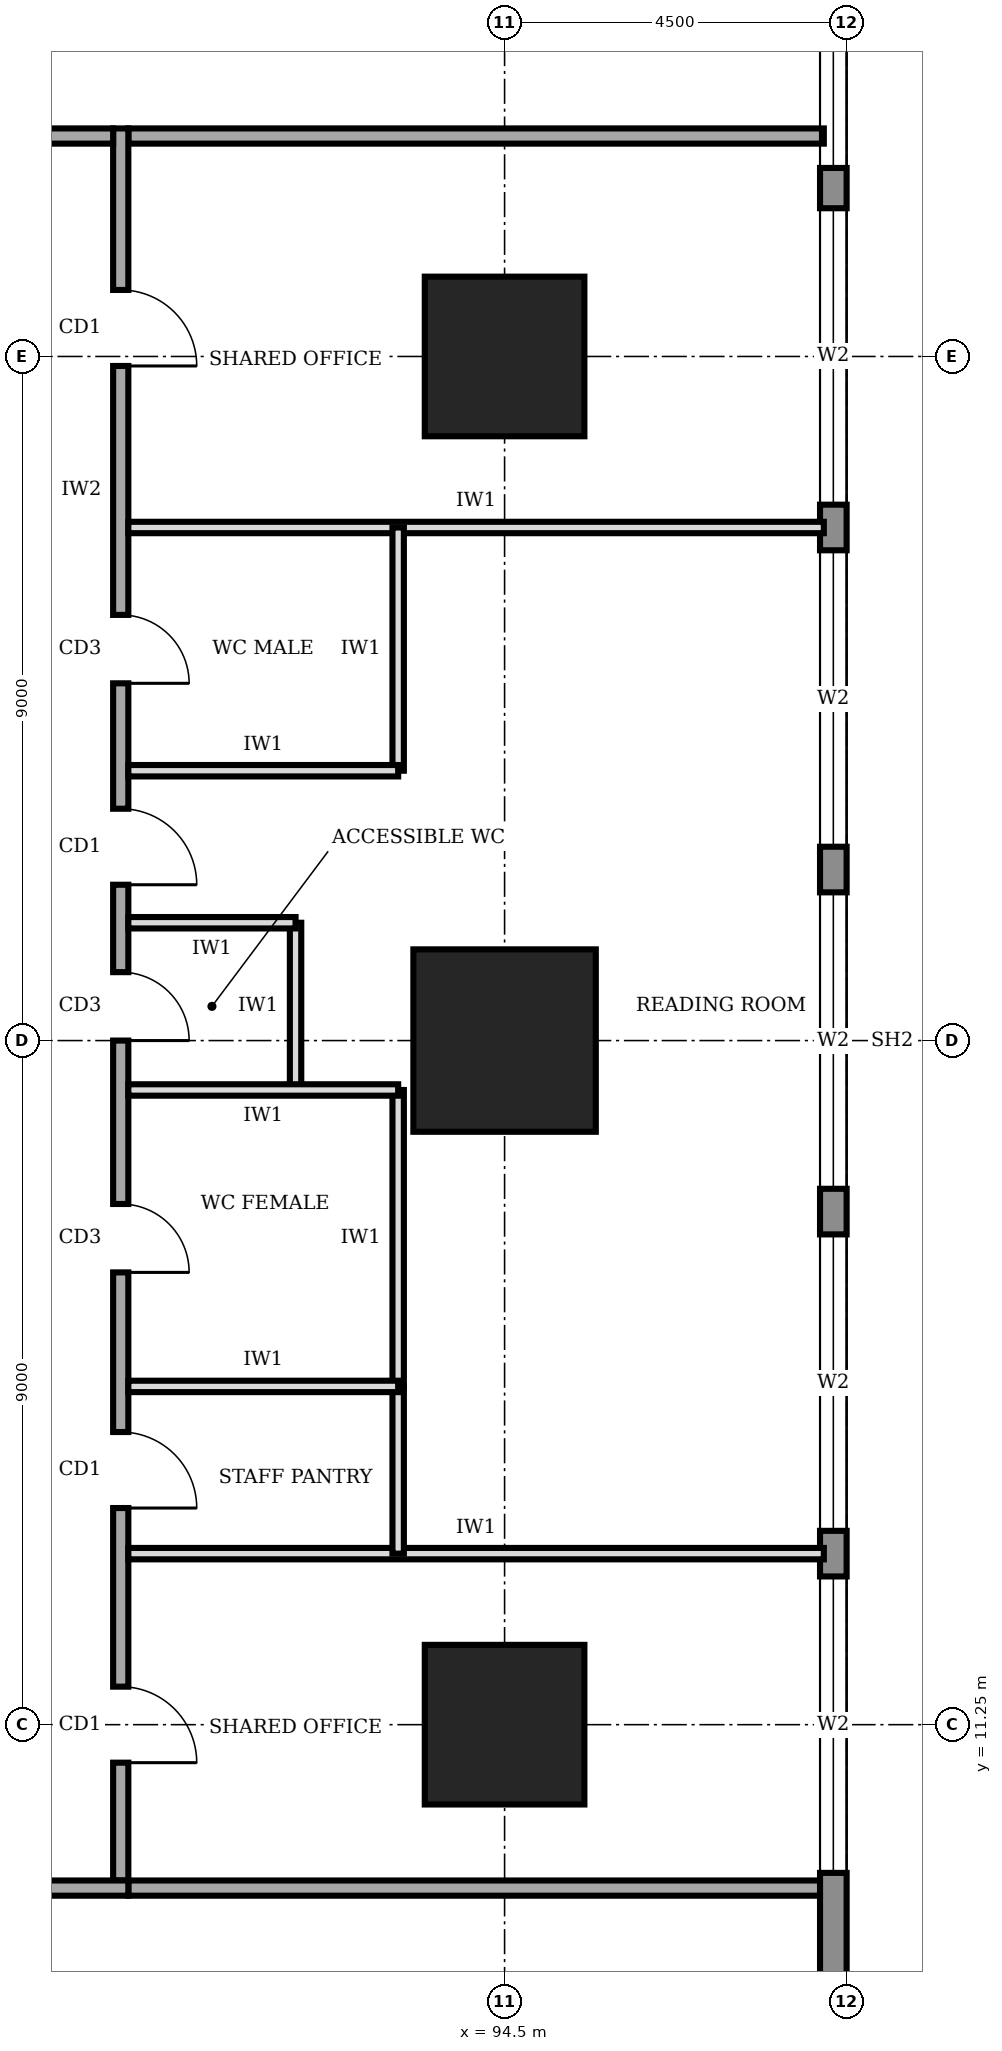
"""IFC4 building model, lengths in metres.
Left out: names, types, materials, properties, quantities, classifications, styles, units other than length and angle.
Written with IfcOpenShell. Run it as: python <this file> out.ifc"""

import sys

from ifc_helpers import new_model, si_unit, direction, frame, frame_2d, origin, origin_2d, place, context, subcontext, project, spatial, rectangle, extrude, element, fill, save


model = new_model("IFC4")
c1 = context("Model", 3, precision=1e-05, world=origin(), true_north=direction((0.0, 1.0)))
c2 = subcontext(c1, "Body", "Model", "MODEL_VIEW")
j1 = project(units=[si_unit("LENGTHUNIT", "METRE"), si_unit("PLANEANGLEUNIT", "RADIAN")], contexts=[c1])
p1 = place(None, origin())
s1 = spatial("IfcSite", under=j1, at=p1, CompositionType="ELEMENT")
p2 = place(p1, origin())
s2 = spatial("IfcBuilding", under=s1, at=p2, CompositionType="ELEMENT")
p3 = place(p2, frame((0.0, 0.0, 49.0)))
s3 = spatial("IfcBuildingStorey", under=s2, at=p3, CompositionType="ELEMENT", Elevation=49.0)
p4 = place(p3, frame((94.5, 11.25, 0.0), z_axis=(0.0, 0.0, 1.0), x_axis=(1.0, 0.0, 0.0)))
e1 = element("IfcColumn", 1, at=p4, inside=s3, PredefinedType="COLUMN", context=c2, shape_type="SweptSolid", body=[
    extrude(rectangle(XDim=2.1, YDim=2.1, at=origin_2d()), origin(), (0.0, 0.0, 1.0), 4.0),
])
p5 = place(p3, frame((94.5, 20.25, 0.0), z_axis=(0.0, 0.0, 1.0), x_axis=(1.0, 0.0, 0.0)))
e2 = element("IfcColumn", 2, at=p5, inside=s3, PredefinedType="COLUMN", context=c2, shape_type="SweptSolid", body=[
    extrude(rectangle(XDim=2.4, YDim=2.4, at=origin_2d()), origin(), (0.0, 0.0, 1.0), 4.0),
])
p6 = place(p3, frame((94.5, 29.25, 0.0), z_axis=(0.0, 0.0, 1.0), x_axis=(1.0, 0.0, 0.0)))
e3 = element("IfcColumn", 3, at=p6, inside=s3, PredefinedType="COLUMN", context=c2, shape_type="SweptSolid", body=[
    extrude(rectangle(XDim=2.1, YDim=2.1, at=origin_2d()), origin(), (0.0, 0.0, 1.0), 4.0),
])
p7 = place(p3, frame((98.825, 4.52, 0.0), z_axis=(0.0, 0.0, 1.0), x_axis=(0.0, 1.0, 0.0)))
e4 = element("IfcWall", 4, at=p7, inside=s3, PredefinedType="STANDARD", context=c2, shape_type="SweptSolid", body=[
    extrude(rectangle(XDim=31.46, YDim=0.35, at=frame_2d((15.73, 0.0))), origin(), (0.0, 0.0, 1.0), 3.75),
])
p8 = place(p7, frame((4.78, 0.0, 0.6)))
e5 = element("IfcOpeningElement", 5, at=p8, cuts=e4, PredefinedType="OPENING", context=c2, shape_type="SweptSolid", body=[
    extrude(rectangle(XDim=3.9, YDim=2.6, at=frame_2d((1.95, 1.3))), frame((0.0, 0.185, 0.0), z_axis=(0.0, -1.0, 0.0), x_axis=(1.0, 0.0, 0.0)), (0.0, 0.0, 1.0), 0.37),
])
p9 = place(p7, frame((9.28, 0.0, 0.6)))
e6 = element("IfcOpeningElement", 6, at=p9, cuts=e4, PredefinedType="OPENING", context=c2, shape_type="SweptSolid", body=[
    extrude(rectangle(XDim=3.9, YDim=2.6, at=frame_2d((1.95, 1.3))), frame((0.0, 0.185, 0.0), z_axis=(0.0, -1.0, 0.0), x_axis=(1.0, 0.0, 0.0)), (0.0, 0.0, 1.0), 0.37),
])
p10 = place(p7, frame((13.78, 0.0, 0.6)))
e7 = element("IfcOpeningElement", 7, at=p10, cuts=e4, PredefinedType="OPENING", context=c2, shape_type="SweptSolid", body=[
    extrude(rectangle(XDim=3.9, YDim=2.6, at=frame_2d((1.95, 1.3))), frame((0.0, 0.185, 0.0), z_axis=(0.0, -1.0, 0.0), x_axis=(1.0, 0.0, 0.0)), (0.0, 0.0, 1.0), 0.37),
])
p11 = place(p7, frame((18.28, 0.0, 0.6)))
e8 = element("IfcOpeningElement", 8, at=p11, cuts=e4, PredefinedType="OPENING", context=c2, shape_type="SweptSolid", body=[
    extrude(rectangle(XDim=3.9, YDim=2.6, at=frame_2d((1.95, 1.3))), frame((0.0, 0.185, 0.0), z_axis=(0.0, -1.0, 0.0), x_axis=(1.0, 0.0, 0.0)), (0.0, 0.0, 1.0), 0.37),
])
p12 = place(p7, frame((22.78, 0.0, 0.6)))
e9 = element("IfcOpeningElement", 9, at=p12, cuts=e4, PredefinedType="OPENING", context=c2, shape_type="SweptSolid", body=[
    extrude(rectangle(XDim=3.9, YDim=2.6, at=frame_2d((1.95, 1.3))), frame((0.0, 0.185, 0.0), z_axis=(0.0, -1.0, 0.0), x_axis=(1.0, 0.0, 0.0)), (0.0, 0.0, 1.0), 0.37),
])
p13 = place(p7, frame((27.21, 0.0, 0.6)))
e10 = element("IfcOpeningElement", 10, at=p13, cuts=e4, PredefinedType="OPENING", context=c2, shape_type="SweptSolid", body=[
    extrude(rectangle(XDim=3.9, YDim=2.6, at=frame_2d((1.95, 1.3))), frame((0.0, 0.185, 0.0), z_axis=(0.0, -1.0, 0.0), x_axis=(1.0, 0.0, 0.0)), (0.0, 0.0, 1.0), 0.37),
])
p14 = place(p3, frame((71.9, 9.1, 0.0), z_axis=(0.0, 0.0, 1.0), x_axis=(1.0, 0.0, 0.0)))
e11 = element("IfcWall", 11, at=p14, inside=s3, PredefinedType="SOLIDWALL", context=c2, shape_type="SweptSolid", body=[
    extrude(rectangle(XDim=17.65, YDim=0.2, at=frame_2d((8.825, 0.0))), origin(), (0.0, 0.0, 1.0), 3.75),
])
p15 = place(p14, frame((5.8, 0.0, 0.0)))
e12 = element("IfcOpeningElement", 12, at=p15, cuts=e11, PredefinedType="OPENING", context=c2, shape_type="SweptSolid", body=[
    extrude(rectangle(XDim=1.8, YDim=2.1, at=frame_2d((0.9, 1.05))), frame((0.0, 0.11, 0.0), z_axis=(0.0, -1.0, 0.0), x_axis=(1.0, 0.0, 0.0)), (0.0, 0.0, 1.0), 0.22),
])
p16 = place(p14, frame((14.725, 0.0, 0.0)))
e13 = element("IfcOpeningElement", 13, at=p16, cuts=e11, PredefinedType="OPENING", context=c2, shape_type="SweptSolid", body=[
    extrude(rectangle(XDim=1.8, YDim=2.1, at=frame_2d((0.9, 1.05))), frame((0.0, 0.11, 0.0), z_axis=(0.0, -1.0, 0.0), x_axis=(1.0, 0.0, 0.0)), (0.0, 0.0, 1.0), 0.22),
])
p17 = place(p3, frame((89.45, 9.2, 0.0), z_axis=(0.0, 0.0, 1.0), x_axis=(0.0, 1.0, 0.0)))
e14 = element("IfcWall", 14, at=p17, inside=s3, PredefinedType="SOLIDWALL", context=c2, shape_type="SweptSolid", body=[
    extrude(rectangle(XDim=23.05, YDim=0.2, at=frame_2d((11.525, 0.0))), origin(), (0.0, 0.0, 1.0), 3.75),
])
p18 = place(p17, frame((1.55, 0.0, 0.0)))
e15 = element("IfcOpeningElement", 15, at=p18, cuts=e14, PredefinedType="OPENING", context=c2, shape_type="SweptSolid", body=[
    extrude(rectangle(XDim=1.0, YDim=2.1, at=frame_2d((0.5, 1.05))), frame((0.0, 0.11, 0.0), z_axis=(0.0, -1.0, 0.0), x_axis=(1.0, 0.0, 0.0)), (0.0, 0.0, 1.0), 0.22),
])
p19 = place(p17, frame((4.9, 0.0, 0.0)))
e16 = element("IfcOpeningElement", 16, at=p19, cuts=e14, PredefinedType="OPENING", context=c2, shape_type="SweptSolid", body=[
    extrude(rectangle(XDim=1.0, YDim=2.1, at=frame_2d((0.5, 1.05))), frame((0.0, 0.11, 0.0), z_axis=(0.0, -1.0, 0.0), x_axis=(1.0, 0.0, 0.0)), (0.0, 0.0, 1.0), 0.22),
])
p20 = place(p17, frame((8.0, 0.0, 0.0)))
e17 = element("IfcOpeningElement", 17, at=p20, cuts=e14, PredefinedType="OPENING", context=c2, shape_type="SweptSolid", body=[
    extrude(rectangle(XDim=0.9, YDim=2.1, at=frame_2d((0.45, 1.05))), frame((0.0, 0.11, 0.0), z_axis=(0.0, -1.0, 0.0), x_axis=(1.0, 0.0, 0.0)), (0.0, 0.0, 1.0), 0.22),
])
p21 = place(p17, frame((11.05, 0.0, 0.0)))
e18 = element("IfcOpeningElement", 18, at=p21, cuts=e14, PredefinedType="OPENING", context=c2, shape_type="SweptSolid", body=[
    extrude(rectangle(XDim=0.9, YDim=2.1, at=frame_2d((0.45, 1.05))), frame((0.0, 0.11, 0.0), z_axis=(0.0, -1.0, 0.0), x_axis=(1.0, 0.0, 0.0)), (0.0, 0.0, 1.0), 0.22),
])
p22 = place(p17, frame((15.75, 0.0, 0.0)))
e19 = element("IfcOpeningElement", 19, at=p22, cuts=e14, PredefinedType="OPENING", context=c2, shape_type="SweptSolid", body=[
    extrude(rectangle(XDim=0.9, YDim=2.1, at=frame_2d((0.45, 1.05))), frame((0.0, 0.11, 0.0), z_axis=(0.0, -1.0, 0.0), x_axis=(1.0, 0.0, 0.0)), (0.0, 0.0, 1.0), 0.22),
])
p23 = place(p17, frame((13.1, 0.0, 0.0)))
e20 = element("IfcOpeningElement", 20, at=p23, cuts=e14, PredefinedType="OPENING", context=c2, shape_type="SweptSolid", body=[
    extrude(rectangle(XDim=1.0, YDim=2.1, at=frame_2d((0.5, 1.05))), frame((0.0, 0.11, 0.0), z_axis=(0.0, -1.0, 0.0), x_axis=(1.0, 0.0, 0.0)), (0.0, 0.0, 1.0), 0.22),
])
p24 = place(p17, frame((19.925, 0.0, 0.0)))
e21 = element("IfcOpeningElement", 21, at=p24, cuts=e14, PredefinedType="OPENING", context=c2, shape_type="SweptSolid", body=[
    extrude(rectangle(XDim=1.0, YDim=2.1, at=frame_2d((0.5, 1.05))), frame((0.0, 0.11, 0.0), z_axis=(0.0, -1.0, 0.0), x_axis=(1.0, 0.0, 0.0)), (0.0, 0.0, 1.0), 0.22),
])
p25 = place(p3, frame((89.35, 32.15, 0.0), z_axis=(0.0, 0.0, 1.0), x_axis=(-1.0, 0.0, 0.0)))
e22 = element("IfcWall", 22, at=p25, inside=s3, PredefinedType="SOLIDWALL", context=c2, shape_type="SweptSolid", body=[
    extrude(rectangle(XDim=17.65, YDim=0.2, at=frame_2d((8.825, 0.0))), origin(), (0.0, 0.0, 1.0), 3.75),
])
p26 = place(p25, frame((14.75, 0.0, 0.0)))
e23 = element("IfcOpeningElement", 23, at=p26, cuts=e22, PredefinedType="OPENING", context=c2, shape_type="SweptSolid", body=[
    extrude(rectangle(XDim=1.0, YDim=2.1, at=frame_2d((0.5, 1.05))), frame((0.0, 0.11, 0.0), z_axis=(0.0, -1.0, 0.0), x_axis=(1.0, 0.0, 0.0)), (0.0, 0.0, 1.0), 0.22),
])
p27 = place(p25, frame((7.85, 0.0, 0.0)))
e24 = element("IfcOpeningElement", 24, at=p27, cuts=e22, PredefinedType="OPENING", context=c2, shape_type="SweptSolid", body=[
    extrude(rectangle(XDim=1.0, YDim=2.1, at=frame_2d((0.5, 1.05))), frame((0.0, 0.11, 0.0), z_axis=(0.0, -1.0, 0.0), x_axis=(1.0, 0.0, 0.0)), (0.0, 0.0, 1.0), 0.22),
])
p28 = place(p25, frame((1.325, 0.0, 0.0)))
e25 = element("IfcOpeningElement", 25, at=p28, cuts=e22, PredefinedType="OPENING", context=c2, shape_type="SweptSolid", body=[
    extrude(rectangle(XDim=1.0, YDim=2.1, at=frame_2d((0.5, 1.05))), frame((0.0, 0.11, 0.0), z_axis=(0.0, -1.0, 0.0), x_axis=(1.0, 0.0, 0.0)), (0.0, 0.0, 1.0), 0.22),
])
for number, where, z_axis, x_axis in (
    (26, (89.55, 9.1, 0.0), (0.0, 0.0, 1.0), (1.0, 0.0, 0.0)),
    (27, (89.55, 32.15, 0.0), (0.0, 0.0, 1.0), (1.0, 0.0, 0.0)),
):
    element("IfcWall", number, at=place(p3, frame(where, z_axis=z_axis, x_axis=x_axis)), inside=s3, PredefinedType="SOLIDWALL", context=c2, shape_type="SweptSolid", body=[
        extrude(rectangle(XDim=9.15, YDim=0.2, at=frame_2d((4.575, 0.0))), origin(), (0.0, 0.0, 1.0), 3.75),
    ])
for number, where, z_axis, x_axis in (
    (28, (89.55, 13.5, 0.0), (0.0, 0.0, 1.0), (1.0, 0.0, 0.0)),
    (29, (89.55, 27.0, 0.0), (0.0, 0.0, 1.0), (1.0, 0.0, 0.0)),
):
    element("IfcWall", number, at=place(p3, frame(where, z_axis=z_axis, x_axis=x_axis)), inside=s3, PredefinedType="PARTITIONING", context=c2, shape_type="SweptSolid", body=[
        extrude(rectangle(XDim=9.15, YDim=0.15, at=frame_2d((4.575, 0.0))), origin(), (0.0, 0.0, 1.0), 3.75),
    ])
p29 = place(p3, frame((89.55, 15.7, 0.0), z_axis=(0.0, 0.0, 1.0), x_axis=(1.0, 0.0, 0.0)))
e30 = element("IfcWall", 30, at=p29, inside=s3, PredefinedType="PARTITIONING", context=c2, shape_type="SweptSolid", body=[
    extrude(rectangle(XDim=3.55, YDim=0.15, at=frame_2d((1.775, 0.0))), origin(), (0.0, 0.0, 1.0), 3.75),
])
p30 = place(p3, frame((89.55, 19.6, 0.0), z_axis=(0.0, 0.0, 1.0), x_axis=(1.0, 0.0, 0.0)))
e31 = element("IfcWall", 31, at=p30, inside=s3, PredefinedType="PARTITIONING", context=c2, shape_type="SweptSolid", body=[
    extrude(rectangle(XDim=3.55, YDim=0.15, at=frame_2d((1.775, 0.0))), origin(), (0.0, 0.0, 1.0), 2.85),
])
p31 = place(p3, frame((89.55, 21.8, 0.0), z_axis=(0.0, 0.0, 1.0), x_axis=(1.0, 0.0, 0.0)))
e32 = element("IfcWall", 32, at=p31, inside=s3, PredefinedType="PARTITIONING", context=c2, shape_type="SweptSolid", body=[
    extrude(rectangle(XDim=2.2, YDim=0.15, at=frame_2d((1.1, 0.0))), origin(), (0.0, 0.0, 1.0), 3.75),
])
p32 = place(p3, frame((89.55, 23.8, 0.0), z_axis=(0.0, 0.0, 1.0), x_axis=(1.0, 0.0, 0.0)))
e33 = element("IfcWall", 33, at=p32, inside=s3, PredefinedType="PARTITIONING", context=c2, shape_type="SweptSolid", body=[
    extrude(rectangle(XDim=3.55, YDim=0.15, at=frame_2d((1.775, 0.0))), origin(), (0.0, 0.0, 1.0), 3.75),
])
p33 = place(p3, frame((93.1, 13.5, 0.0), z_axis=(0.0, 0.0, 1.0), x_axis=(0.0, 1.0, 0.0)))
e34 = element("IfcWall", 34, at=p33, inside=s3, PredefinedType="PARTITIONING", context=c2, shape_type="SweptSolid", body=[
    extrude(rectangle(XDim=2.2, YDim=0.15, at=frame_2d((1.1, 0.0))), origin(), (0.0, 0.0, 1.0), 3.75),
])
p34 = place(p3, frame((93.1, 15.7, 0.0), z_axis=(0.0, 0.0, 1.0), x_axis=(0.0, 1.0, 0.0)))
e35 = element("IfcWall", 35, at=p34, inside=s3, PredefinedType="PARTITIONING", context=c2, shape_type="SweptSolid", body=[
    extrude(rectangle(XDim=3.9, YDim=0.15, at=frame_2d((1.95, 0.0))), origin(), (0.0, 0.0, 1.0), 3.75),
])
p35 = place(p3, frame((91.75, 19.6, 0.0), z_axis=(0.0, 0.0, 1.0), x_axis=(0.0, 1.0, 0.0)))
e36 = element("IfcWall", 36, at=p35, inside=s3, PredefinedType="PARTITIONING", context=c2, shape_type="SweptSolid", body=[
    extrude(rectangle(XDim=2.2, YDim=0.15, at=frame_2d((1.1, 0.0))), origin(), (0.0, 0.0, 1.0), 3.75),
])
p36 = place(p3, frame((93.1, 23.8, 0.0), z_axis=(0.0, 0.0, 1.0), x_axis=(0.0, 1.0, 0.0)))
e37 = element("IfcWall", 37, at=p36, inside=s3, PredefinedType="PARTITIONING", context=c2, shape_type="SweptSolid", body=[
    extrude(rectangle(XDim=3.2, YDim=0.15, at=frame_2d((1.6, 0.0))), origin(), (0.0, 0.0, 1.0), 3.75),
])
p37 = place(p8, origin())
e38 = element("IfcWindow", 38, at=p37, inside=s3, PartitioningType="SINGLE_PANEL", PredefinedType="WINDOW", context=c2, shape_type="SweptSolid", body=[
    extrude(rectangle(XDim=3.9, YDim=2.6, at=frame_2d((1.95, 1.3))), frame((0.0, 0.03, 0.0), z_axis=(0.0, -1.0, 0.0), x_axis=(1.0, 0.0, 0.0)), (0.0, 0.0, 1.0), 0.06),
])
fill(e5, e38)
p38 = place(p9, origin())
e39 = element("IfcWindow", 39, at=p38, inside=s3, PartitioningType="SINGLE_PANEL", PredefinedType="WINDOW", context=c2, shape_type="SweptSolid", body=[
    extrude(rectangle(XDim=3.9, YDim=2.6, at=frame_2d((1.95, 1.3))), frame((0.0, 0.03, 0.0), z_axis=(0.0, -1.0, 0.0), x_axis=(1.0, 0.0, 0.0)), (0.0, 0.0, 1.0), 0.06),
])
fill(e6, e39)
p39 = place(p10, origin())
e40 = element("IfcWindow", 40, at=p39, inside=s3, PartitioningType="SINGLE_PANEL", PredefinedType="WINDOW", context=c2, shape_type="SweptSolid", body=[
    extrude(rectangle(XDim=3.9, YDim=2.6, at=frame_2d((1.95, 1.3))), frame((0.0, 0.03, 0.0), z_axis=(0.0, -1.0, 0.0), x_axis=(1.0, 0.0, 0.0)), (0.0, 0.0, 1.0), 0.06),
])
fill(e7, e40)
p40 = place(p11, origin())
e41 = element("IfcWindow", 41, at=p40, inside=s3, PartitioningType="SINGLE_PANEL", PredefinedType="WINDOW", context=c2, shape_type="SweptSolid", body=[
    extrude(rectangle(XDim=3.9, YDim=2.6, at=frame_2d((1.95, 1.3))), frame((0.0, 0.03, 0.0), z_axis=(0.0, -1.0, 0.0), x_axis=(1.0, 0.0, 0.0)), (0.0, 0.0, 1.0), 0.06),
])
fill(e8, e41)
p41 = place(p12, origin())
e42 = element("IfcWindow", 42, at=p41, inside=s3, PartitioningType="SINGLE_PANEL", PredefinedType="WINDOW", context=c2, shape_type="SweptSolid", body=[
    extrude(rectangle(XDim=3.9, YDim=2.6, at=frame_2d((1.95, 1.3))), frame((0.0, 0.03, 0.0), z_axis=(0.0, -1.0, 0.0), x_axis=(1.0, 0.0, 0.0)), (0.0, 0.0, 1.0), 0.06),
])
fill(e9, e42)
p42 = place(p13, origin())
e43 = element("IfcWindow", 43, at=p42, inside=s3, PartitioningType="SINGLE_PANEL", PredefinedType="WINDOW", context=c2, shape_type="SweptSolid", body=[
    extrude(rectangle(XDim=3.9, YDim=2.6, at=frame_2d((1.95, 1.3))), frame((0.0, 0.03, 0.0), z_axis=(0.0, -1.0, 0.0), x_axis=(1.0, 0.0, 0.0)), (0.0, 0.0, 1.0), 0.06),
])
fill(e10, e43)
p43 = place(p18, frame((1.0, 0.0, 0.0), z_axis=(0.0, 0.0, 1.0), x_axis=(-1.0, 0.0, 0.0)))
e44 = element("IfcDoor", 44, at=p43, inside=s3, OperationType="SINGLE_SWING_RIGHT", PredefinedType="DOOR", context=c2, shape_type="SweptSolid", body=[
    extrude(rectangle(XDim=1.0, YDim=2.1, at=frame_2d((0.5, 1.05))), frame((0.0, 0.025, 0.0), z_axis=(0.0, -1.0, 0.0), x_axis=(1.0, 0.0, 0.0)), (0.0, 0.0, 1.0), 0.05),
])
fill(e15, e44)
p44 = place(p19, frame((1.0, 0.0, 0.0), z_axis=(0.0, 0.0, 1.0), x_axis=(-1.0, 0.0, 0.0)))
e45 = element("IfcDoor", 45, at=p44, inside=s3, OperationType="SINGLE_SWING_RIGHT", PredefinedType="DOOR", context=c2, shape_type="SweptSolid", body=[
    extrude(rectangle(XDim=1.0, YDim=2.1, at=frame_2d((0.5, 1.05))), frame((0.0, 0.025, 0.0), z_axis=(0.0, -1.0, 0.0), x_axis=(1.0, 0.0, 0.0)), (0.0, 0.0, 1.0), 0.05),
])
fill(e16, e45)
p45 = place(p20, frame((0.9, 0.0, 0.0), z_axis=(0.0, 0.0, 1.0), x_axis=(-1.0, 0.0, 0.0)))
e46 = element("IfcDoor", 46, at=p45, inside=s3, OperationType="SINGLE_SWING_RIGHT", PredefinedType="DOOR", context=c2, shape_type="SweptSolid", body=[
    extrude(rectangle(XDim=0.9, YDim=2.1, at=frame_2d((0.45, 1.05))), frame((0.0, 0.025, 0.0), z_axis=(0.0, -1.0, 0.0), x_axis=(1.0, 0.0, 0.0)), (0.0, 0.0, 1.0), 0.05),
])
fill(e17, e46)
p46 = place(p21, frame((0.9, 0.0, 0.0), z_axis=(0.0, 0.0, 1.0), x_axis=(-1.0, 0.0, 0.0)))
e47 = element("IfcDoor", 47, at=p46, inside=s3, OperationType="SINGLE_SWING_RIGHT", PredefinedType="DOOR", context=c2, shape_type="SweptSolid", body=[
    extrude(rectangle(XDim=0.9, YDim=2.1, at=frame_2d((0.45, 1.05))), frame((0.0, 0.025, 0.0), z_axis=(0.0, -1.0, 0.0), x_axis=(1.0, 0.0, 0.0)), (0.0, 0.0, 1.0), 0.05),
])
fill(e18, e47)
p47 = place(p22, frame((0.9, 0.0, 0.0), z_axis=(0.0, 0.0, 1.0), x_axis=(-1.0, 0.0, 0.0)))
e48 = element("IfcDoor", 48, at=p47, inside=s3, OperationType="SINGLE_SWING_RIGHT", PredefinedType="DOOR", context=c2, shape_type="SweptSolid", body=[
    extrude(rectangle(XDim=0.9, YDim=2.1, at=frame_2d((0.45, 1.05))), frame((0.0, 0.025, 0.0), z_axis=(0.0, -1.0, 0.0), x_axis=(1.0, 0.0, 0.0)), (0.0, 0.0, 1.0), 0.05),
])
fill(e19, e48)
p48 = place(p23, frame((1.0, 0.0, 0.0), z_axis=(0.0, 0.0, 1.0), x_axis=(-1.0, 0.0, 0.0)))
e49 = element("IfcDoor", 49, at=p48, inside=s3, OperationType="SINGLE_SWING_RIGHT", PredefinedType="DOOR", context=c2, shape_type="SweptSolid", body=[
    extrude(rectangle(XDim=1.0, YDim=2.1, at=frame_2d((0.5, 1.05))), frame((0.0, 0.025, 0.0), z_axis=(0.0, -1.0, 0.0), x_axis=(1.0, 0.0, 0.0)), (0.0, 0.0, 1.0), 0.05),
])
fill(e20, e49)
p49 = place(p24, frame((1.0, 0.0, 0.0), z_axis=(0.0, 0.0, 1.0), x_axis=(-1.0, 0.0, 0.0)))
e50 = element("IfcDoor", 50, at=p49, inside=s3, OperationType="SINGLE_SWING_RIGHT", PredefinedType="DOOR", context=c2, shape_type="SweptSolid", body=[
    extrude(rectangle(XDim=1.0, YDim=2.1, at=frame_2d((0.5, 1.05))), frame((0.0, 0.025, 0.0), z_axis=(0.0, -1.0, 0.0), x_axis=(1.0, 0.0, 0.0)), (0.0, 0.0, 1.0), 0.05),
])
fill(e21, e50)
save(model, sys.argv[1])
